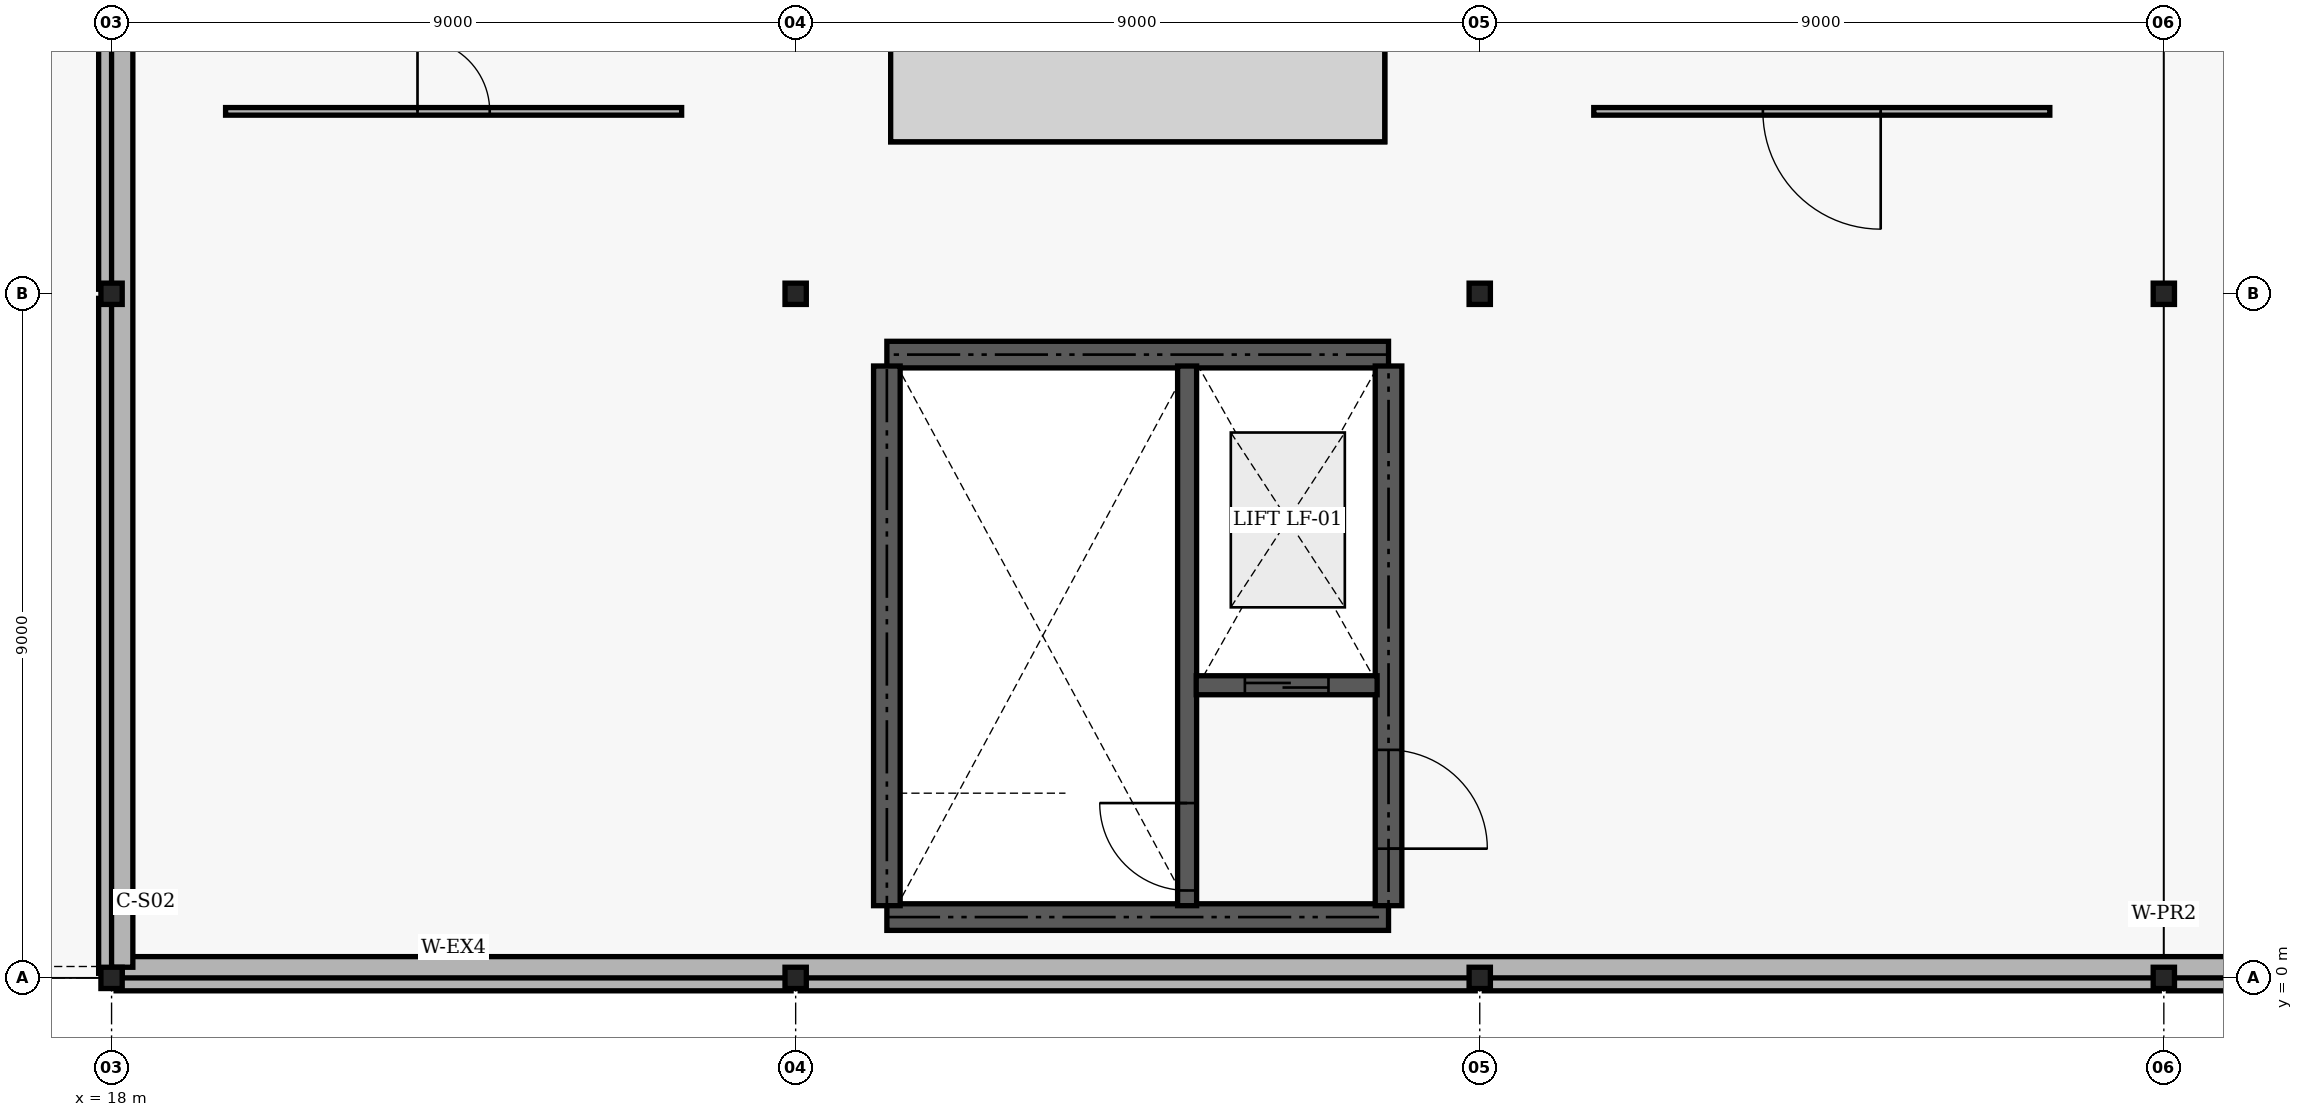
"""IFC4 building model, lengths in metres.
Left out: names, types, materials, properties, quantities, classifications, styles, units other than length and angle.
Written with IfcOpenShell. Run it as: python <this file> out.ifc"""

import sys

from ifc_helpers import new_model, si_unit, direction, frame, frame_2d, origin, origin_2d, place, context, subcontext, project, spatial, rectangle, i_section, extrude, element, fill, save


model = new_model("IFC4")
c1 = context("Model", 3, precision=1e-05, world=origin(), true_north=direction((0.0, 1.0)))
c2 = subcontext(c1, "Body", "Model", "MODEL_VIEW")
j1 = project(units=[si_unit("LENGTHUNIT", "METRE"), si_unit("PLANEANGLEUNIT", "RADIAN")], contexts=[c1])
p1 = place(None, origin())
s1 = spatial("IfcSite", under=j1, at=p1, CompositionType="ELEMENT")
p2 = place(p1, origin())
s2 = spatial("IfcBuilding", under=s1, at=p2, CompositionType="ELEMENT")
p3 = place(p2, frame((0.0, 0.0, 13.5)))
s3 = spatial("IfcBuildingStorey", under=s2, at=p3, CompositionType="ELEMENT", Elevation=13.5)
for number, where, z_axis, x_axis in (
    (1, (18.0, 0.0, 0.0), (0.0, 0.0, 1.0), (1.0, 0.0, 0.0)),
    (2, (18.0, 9.0, 0.0), (0.0, 0.0, 1.0), (1.0, 0.0, 0.0)),
    (3, (27.0, 0.0, 0.0), (0.0, 0.0, 1.0), (1.0, 0.0, 0.0)),
    (4, (27.0, 9.0, 0.0), (0.0, 0.0, 1.0), (1.0, 0.0, 0.0)),
    (5, (36.0, 0.0, 0.0), (0.0, 0.0, 1.0), (1.0, 0.0, 0.0)),
    (6, (36.0, 9.0, 0.0), (0.0, 0.0, 1.0), (1.0, 0.0, 0.0)),
    (7, (45.0, 0.0, 0.0), (0.0, 0.0, 1.0), (1.0, 0.0, 0.0)),
    (8, (45.0, 9.0, 0.0), (0.0, 0.0, 1.0), (1.0, 0.0, 0.0)),
):
    element("IfcColumn", number, at=place(p3, frame(where, z_axis=z_axis, x_axis=x_axis)), inside=s3, PredefinedType="COLUMN", context=c2, shape_type="SweptSolid", body=[
        extrude(i_section(OverallWidth=0.28, OverallDepth=0.28, WebThickness=0.01, FlangeThickness=0.018, FilletRadius=0.024, at=origin_2d()), origin(), (0.0, 0.0, 1.0), 3.9),
    ])
for number, where, z_axis, x_axis in (
    (9, (18.06, 0.0, 0.0), (0.0, 0.0, 1.0), (1.0, 0.0, 0.0)),
    (10, (27.06, 0.0, 0.0), (0.0, 0.0, 1.0), (1.0, 0.0, 0.0)),
    (11, (36.06, 0.0, 0.0), (0.0, 0.0, 1.0), (1.0, 0.0, 0.0)),
    (12, (45.06, 0.0, 0.0), (0.0, 0.0, 1.0), (1.0, 0.0, 0.0)),
    (13, (18.0, 0.06, 0.0), (0.0, 0.0, 1.0), (0.0, 1.0, 0.0)),
):
    element("IfcWall", number, at=place(p3, frame(where, z_axis=z_axis, x_axis=x_axis)), inside=s3, PredefinedType="SOLIDWALL", context=c2, shape_type="SweptSolid", body=[
        extrude(rectangle(XDim=8.88, YDim=0.34, at=frame_2d((4.44, 0.0))), origin(), (0.0, 0.0, 1.0), 3.2),
    ])
p4 = place(p3, frame((18.0, 9.06, 0.0), z_axis=(0.0, 0.0, 1.0), x_axis=(0.0, 1.0, 0.0)))
e14 = element("IfcWall", 14, at=p4, inside=s3, PredefinedType="SOLIDWALL", context=c2, shape_type="SweptSolid", body=[
    extrude(rectangle(XDim=8.88, YDim=0.34, at=frame_2d((4.44, 0.0))), origin(), (0.0, 0.0, 1.0), 3.2),
])
p5 = place(p4, frame((3.89, 0.0, 0.0)))
e15 = element("IfcOpeningElement", 15, at=p5, cuts=e14, PredefinedType="OPENING", context=c2, shape_type="SweptSolid", body=[
    extrude(rectangle(XDim=1.1, YDim=2.15, at=frame_2d((0.55, 1.075))), frame((0.0, 0.18, 0.0), z_axis=(0.0, -1.0, 0.0), x_axis=(1.0, 0.0, 0.0)), (0.0, 0.0, 1.0), 0.36),
])
p6 = place(p3, frame((18.14, 0.14, 3.9), z_axis=(0.0, 0.0, 1.0), x_axis=(1.0, 0.0, 0.0)))
e16 = element("IfcWall", 16, at=p6, inside=s3, PredefinedType="PARAPET", context=c2, shape_type="SweptSolid", body=[
    extrude(rectangle(XDim=53.72, YDim=0.28, at=frame_2d((26.86, 0.0))), origin(), (0.0, 0.0, 1.0), 1.2),
])
p7 = place(p3, frame((18.14, 0.14, 3.9), z_axis=(0.0, 0.0, 1.0), x_axis=(0.0, 1.0, 0.0)))
e17 = element("IfcWall", 17, at=p7, inside=s3, PredefinedType="PARAPET", context=c2, shape_type="SweptSolid", body=[
    extrude(rectangle(XDim=17.72, YDim=0.28, at=frame_2d((8.86, 0.0))), origin(), (0.0, 0.0, 1.0), 1.2),
])
for number, where, z_axis, x_axis in (
    (18, (28.2, 0.8, 0.0), (0.0, 0.0, 1.0), (1.0, 0.0, 0.0)),
    (19, (28.2, 8.2, 0.0), (0.0, 0.0, 1.0), (1.0, 0.0, 0.0)),
):
    element("IfcWall", number, at=place(p3, frame(where, z_axis=z_axis, x_axis=x_axis)), inside=s3, PredefinedType="SHEAR", context=c2, shape_type="SweptSolid", body=[
        extrude(rectangle(XDim=6.6, YDim=0.35, at=frame_2d((3.3, 0.0))), origin(), (0.0, 0.0, 1.0), 3.7),
    ])
p8 = place(p3, frame((28.2, 0.95, 0.0), z_axis=(0.0, 0.0, 1.0), x_axis=(0.0, 1.0, 0.0)))
e20 = element("IfcWall", 20, at=p8, inside=s3, PredefinedType="SHEAR", context=c2, shape_type="SweptSolid", body=[
    extrude(rectangle(XDim=7.1, YDim=0.35, at=frame_2d((3.55, 0.0))), origin(), (0.0, 0.0, 1.0), 3.7),
])
p9 = place(p3, frame((34.8, 0.95, 0.0), z_axis=(0.0, 0.0, 1.0), x_axis=(0.0, 1.0, 0.0)))
e21 = element("IfcWall", 21, at=p9, inside=s3, PredefinedType="SHEAR", context=c2, shape_type="SweptSolid", body=[
    extrude(rectangle(XDim=7.1, YDim=0.35, at=frame_2d((3.55, 0.0))), origin(), (0.0, 0.0, 1.0), 3.7),
])
p10 = place(p9, frame((0.75, 0.0, 0.0)))
e22 = element("IfcOpeningElement", 22, at=p10, cuts=e21, PredefinedType="OPENING", context=c2, shape_type="SweptSolid", body=[
    extrude(rectangle(XDim=1.3, YDim=2.15, at=frame_2d((0.65, 1.075))), frame((0.0, 0.185, 0.0), z_axis=(0.0, -1.0, 0.0), x_axis=(1.0, 0.0, 0.0)), (0.0, 0.0, 1.0), 0.37),
])
p11 = place(p3, frame((32.15, 0.95, 0.0), z_axis=(0.0, 0.0, 1.0), x_axis=(0.0, 1.0, 0.0)))
e23 = element("IfcWall", 23, at=p11, inside=s3, PredefinedType="SHEAR", context=c2, shape_type="SweptSolid", body=[
    extrude(rectangle(XDim=7.1, YDim=0.25, at=frame_2d((3.55, 0.0))), origin(), (0.0, 0.0, 1.0), 3.7),
])
p12 = place(p11, frame((0.2, 0.0, 0.0)))
e24 = element("IfcOpeningElement", 24, at=p12, cuts=e23, PredefinedType="OPENING", context=c2, shape_type="SweptSolid", body=[
    extrude(rectangle(XDim=1.15, YDim=2.15, at=frame_2d((0.575, 1.075))), frame((0.0, 0.135, 0.0), z_axis=(0.0, -1.0, 0.0), x_axis=(1.0, 0.0, 0.0)), (0.0, 0.0, 1.0), 0.27),
])
p13 = place(p3, frame((32.27, 3.85, 0.0), z_axis=(0.0, 0.0, 1.0), x_axis=(1.0, 0.0, 0.0)))
e25 = element("IfcWall", 25, at=p13, inside=s3, PredefinedType="SHEAR", context=c2, shape_type="SweptSolid", body=[
    extrude(rectangle(XDim=2.38, YDim=0.25, at=frame_2d((1.19, 0.0))), origin(), (0.0, 0.0, 1.0), 3.7),
])
p14 = place(p13, frame((0.64, 0.0, 0.0)))
e26 = element("IfcOpeningElement", 26, at=p14, cuts=e25, PredefinedType="OPENING", context=c2, shape_type="SweptSolid", body=[
    extrude(rectangle(XDim=1.1, YDim=2.15, at=frame_2d((0.55, 1.075))), frame((0.0, 0.135, 0.0), z_axis=(0.0, -1.0, 0.0), x_axis=(1.0, 0.0, 0.0)), (0.0, 0.0, 1.0), 0.27),
])
p15 = place(p3, frame((19.5, 11.4, 0.0), z_axis=(0.0, 0.0, 1.0), x_axis=(1.0, 0.0, 0.0)))
e27 = element("IfcWall", 27, at=p15, inside=s3, PredefinedType="PARTITIONING", context=c2, shape_type="SweptSolid", body=[
    extrude(rectangle(XDim=6.0, YDim=0.1, at=frame_2d((3.0, 0.0))), origin(), (0.0, 0.0, 1.0), 2.9),
])
p16 = place(p15, frame((2.525, 0.0, 0.0)))
e28 = element("IfcOpeningElement", 28, at=p16, cuts=e27, PredefinedType="OPENING", context=c2, shape_type="SweptSolid", body=[
    extrude(rectangle(XDim=0.95, YDim=2.1, at=frame_2d((0.475, 1.05))), frame((0.0, 0.06, 0.0), z_axis=(0.0, -1.0, 0.0), x_axis=(1.0, 0.0, 0.0)), (0.0, 0.0, 1.0), 0.12),
])
p17 = place(p3, frame((37.5, 11.4, 0.0), z_axis=(0.0, 0.0, 1.0), x_axis=(1.0, 0.0, 0.0)))
e29 = element("IfcWall", 29, at=p17, inside=s3, PredefinedType="PARTITIONING", context=c2, shape_type="SweptSolid", body=[
    extrude(rectangle(XDim=6.0, YDim=0.1, at=frame_2d((3.0, 0.0))), origin(), (0.0, 0.0, 1.0), 2.9),
])
p18 = place(p17, frame((2.225, 0.0, 0.0)))
e30 = element("IfcOpeningElement", 30, at=p18, cuts=e29, PredefinedType="OPENING", context=c2, shape_type="SweptSolid", body=[
    extrude(rectangle(XDim=1.55, YDim=2.25, at=frame_2d((0.775, 1.125))), frame((0.0, 0.06, 0.0), z_axis=(0.0, -1.0, 0.0), x_axis=(1.0, 0.0, 0.0)), (0.0, 0.0, 1.0), 0.12),
])
p19 = place(p10, frame((1.3, 0.0, 0.0), z_axis=(0.0, 0.0, 1.0), x_axis=(-1.0, 0.0, 0.0)))
e31 = element("IfcDoor", 31, at=p19, inside=s3, OperationType="DOUBLE_DOOR_SINGLE_SWING", PredefinedType="DOOR", context=c2, shape_type="SweptSolid", body=[
    extrude(rectangle(XDim=1.3, YDim=2.15, at=frame_2d((0.65, 1.075))), frame((0.0, 0.025, 0.0), z_axis=(0.0, -1.0, 0.0), x_axis=(1.0, 0.0, 0.0)), (0.0, 0.0, 1.0), 0.05),
])
fill(e22, e31)
p20 = place(p12, frame((1.15, 0.0, 0.0), z_axis=(0.0, 0.0, 1.0), x_axis=(-1.0, 0.0, 0.0)))
e32 = element("IfcDoor", 32, at=p20, inside=s3, OperationType="SINGLE_SWING_RIGHT", PredefinedType="DOOR", context=c2, shape_type="SweptSolid", body=[
    extrude(rectangle(XDim=1.15, YDim=2.15, at=frame_2d((0.575, 1.075))), frame((0.0, 0.025, 0.0), z_axis=(0.0, -1.0, 0.0), x_axis=(1.0, 0.0, 0.0)), (0.0, 0.0, 1.0), 0.05),
])
fill(e24, e32)
p21 = place(p14, origin())
e33 = element("IfcDoor", 33, at=p21, inside=s3, OperationType="SLIDING_TO_LEFT", PredefinedType="DOOR", context=c2, shape_type="SweptSolid", body=[
    extrude(rectangle(XDim=1.1, YDim=2.15, at=frame_2d((0.55, 1.075))), frame((0.0, 0.025, 0.0), z_axis=(0.0, -1.0, 0.0), x_axis=(1.0, 0.0, 0.0)), (0.0, 0.0, 1.0), 0.05),
])
fill(e26, e33)
p22 = place(p16, origin())
e34 = element("IfcDoor", 34, at=p22, inside=s3, OperationType="SINGLE_SWING_LEFT", PredefinedType="DOOR", context=c2, shape_type="SweptSolid", body=[
    extrude(rectangle(XDim=0.95, YDim=2.1, at=frame_2d((0.475, 1.05))), frame((0.0, 0.025, 0.0), z_axis=(0.0, -1.0, 0.0), x_axis=(1.0, 0.0, 0.0)), (0.0, 0.0, 1.0), 0.05),
])
fill(e28, e34)
p23 = place(p18, origin())
e35 = element("IfcDoor", 35, at=p23, inside=s3, OperationType="SINGLE_SWING_RIGHT", PredefinedType="DOOR", context=c2, shape_type="SweptSolid", body=[
    extrude(rectangle(XDim=1.55, YDim=2.25, at=frame_2d((0.775, 1.125))), frame((0.0, 0.025, 0.0), z_axis=(0.0, -1.0, 0.0), x_axis=(1.0, 0.0, 0.0)), (0.0, 0.0, 1.0), 0.05),
])
fill(e30, e35)
save(model, sys.argv[1])
